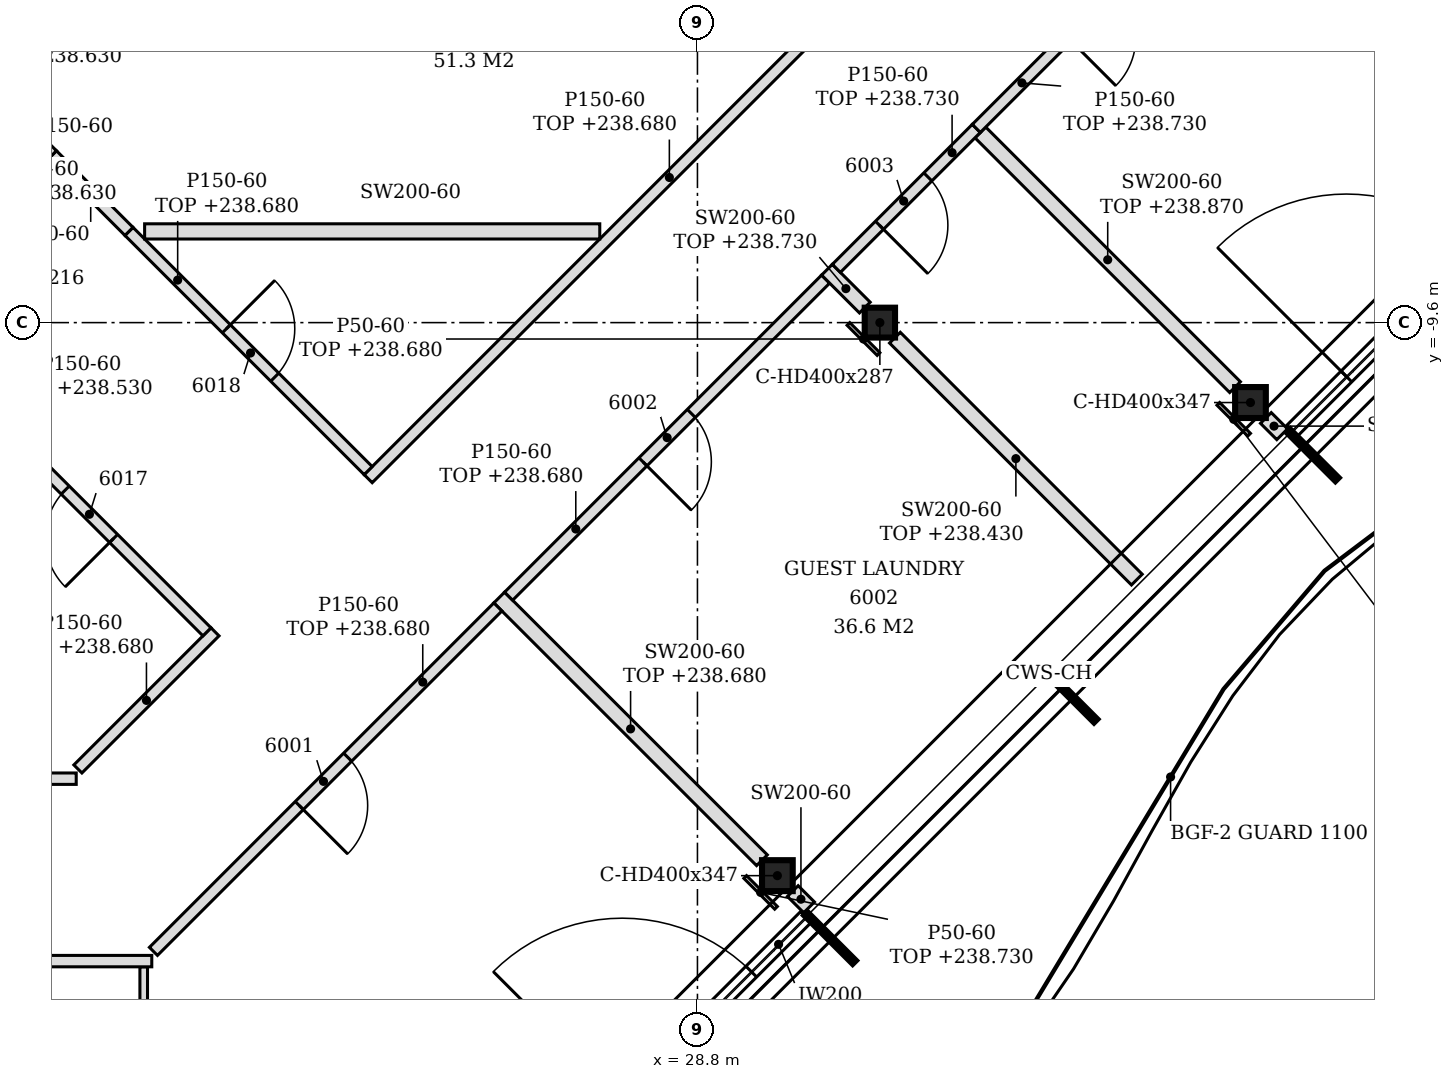
"""IFC4 building model, lengths in metres.
Left out: names, types, materials, properties, quantities, classifications, styles, units other than length and angle.
Written with IfcOpenShell. Run it as: python <this file> out.ifc"""

import sys

from ifc_helpers import new_model, si_unit, direction, frame, frame_2d, origin, origin_2d, place, context, subcontext, project, spatial, polyline, rectangle, i_section, outline, extrude, element, fill, save


model = new_model("IFC4")
c1 = context("Model", 3, precision=1e-05, world=origin(), true_north=direction((0.0, 1.0)))
c2 = subcontext(c1, "Body", "Model", "MODEL_VIEW")
j1 = project(units=[si_unit("LENGTHUNIT", "METRE"), si_unit("PLANEANGLEUNIT", "RADIAN")], contexts=[c1])
p1 = place(None, origin())
s1 = spatial("IfcSite", under=j1, at=p1, CompositionType="ELEMENT")
p2 = place(p1, origin())
s2 = spatial("IfcBuilding", under=s1, at=p2, CompositionType="ELEMENT")
p3 = place(p2, frame((0.0, 0.0, 235.8)))
s3 = spatial("IfcBuildingStorey", under=s2, at=p3, CompositionType="ELEMENT", Elevation=235.8)
for number, where, z_axis, x_axis in (
    (1, (29.852, -16.876, -0.15), (0.0, 0.0, 1.0), (1.0, 0.0, 0.0)),
    (2, (36.076, -10.652, -0.15), (0.0, 0.0, 1.0), (1.0, 0.0, 0.0)),
):
    element("IfcColumn", number, at=place(p3, frame(where, z_axis=z_axis, x_axis=x_axis)), inside=s3, PredefinedType="COLUMN", context=c2, shape_type="SweptSolid", body=[
        extrude(i_section(OverallWidth=0.404, OverallDepth=0.407, WebThickness=0.027, FlangeThickness=0.044, FilletRadius=0.015, at=origin_2d()), origin(), (0.0, 0.0, 1.0), 3.6),
    ])
p4 = place(p3, frame((31.2, -9.6, -0.15), z_axis=(0.0, 0.0, 1.0), x_axis=(1.0, 0.0, 0.0)))
e3 = element("IfcColumn", 3, at=p4, inside=s3, PredefinedType="COLUMN", context=c2, shape_type="SweptSolid", body=[
    extrude(i_section(OverallWidth=0.399, OverallDepth=0.393, WebThickness=0.023, FlangeThickness=0.037, FilletRadius=0.015, at=origin_2d()), origin(), (0.0, 0.0, 1.0), 3.6),
])
p5 = place(p3, frame((27.093, -20.553, 0.0), z_axis=(0.0, 0.0, 1.0), x_axis=(0.707079231393, 0.707134329907, 0.0)))
e4 = element("IfcWall", 4, at=p5, inside=s3, PredefinedType="NOTDEFINED", context=c2, shape_type="SweptSolid", body=[
    extrude(rectangle(XDim=4.431, YDim=0.2, at=frame_2d((2.215, 0.0))), origin(), (0.0, 0.0, 1.0), 3.45),
])
p6 = place(p5, frame((1.015, 0.0, 0.0)))
e5 = element("IfcOpeningElement", 5, at=p6, cuts=e4, PredefinedType="OPENING", context=c2, shape_type="SweptSolid", body=[
    extrude(rectangle(XDim=2.4, YDim=2.4, at=frame_2d((1.2, 1.2))), frame((0.0, 0.11, 0.0), z_axis=(0.0, -1.0, 0.0), x_axis=(1.0, 0.0, 0.0)), (0.0, 0.0, 1.0), 0.22),
])
p7 = place(p3, frame((36.62, -11.026, 0.0), z_axis=(0.0, 0.0, 1.0), x_axis=(0.707106781187, 0.707106781187, 0.0)))
e6 = element("IfcWall", 6, at=p7, inside=s3, PredefinedType="NOTDEFINED", context=c2, shape_type="SweptSolid", body=[
    extrude(rectangle(XDim=4.431, YDim=0.2, at=frame_2d((2.215, 0.0))), origin(), (0.0, 0.0, 1.0), 3.45),
])
p8 = place(p7, frame((1.015, 0.0, 0.0)))
e7 = element("IfcOpeningElement", 7, at=p8, cuts=e6, PredefinedType="OPENING", context=c2, shape_type="SweptSolid", body=[
    extrude(rectangle(XDim=2.4, YDim=2.4, at=frame_2d((1.2, 1.2))), frame((0.0, 0.11, 0.0), z_axis=(0.0, -1.0, 0.0), x_axis=(1.0, 0.0, 0.0)), (0.0, 0.0, 1.0), 0.22),
])
p9 = place(p3, frame((21.515, -20.35, 0.0), z_axis=(0.0, 0.0, 1.0), x_axis=(0.0, 1.0, 0.0)))
e8 = element("IfcWall", 8, at=p9, inside=s3, PredefinedType="PARTITIONING", context=c2, shape_type="SweptSolid", body=[
    extrude(outline(polyline([(0.0, 0.0), (2.275, 0.0), (2.275, 3.45), (1.245, 3.45), (1.243, 2.98), (1.055, 2.98), (1.053, 3.45), (0.0, 3.45), (0.0, 0.0)])), frame((0.0, 0.05, 0.0), z_axis=(0.0, -1.0, 0.0), x_axis=(1.0, 0.0, 0.0)), (0.0, 0.0, 1.0), 0.1),
])
p10 = place(p3, frame((-0.726, -18.0, 0.0), z_axis=(0.0, 0.0, 1.0), x_axis=(1.0, 0.0, 0.0)))
e9 = element("IfcWall", 9, at=p10, inside=s3, PredefinedType="PARTITIONING", context=c2, shape_type="SweptSolid", body=[
    extrude(outline(polyline([(0.0, 0.0), (22.347, 0.0), (22.347, 3.45), (20.076, 3.45), (20.074, 2.73), (19.776, 2.73), (19.774, 3.45), (8.076, 3.45), (8.074, 2.73), (7.776, 2.73), (7.774, 3.45), (1.086, 3.45), (1.084, 2.93), (0.512, 2.93), (0.51, 3.45), (0.0, 3.45), (0.0, 0.0)])), frame((0.0, 0.075, 0.0), z_axis=(0.0, -1.0, 0.0), x_axis=(1.0, 0.0, 0.0)), (0.0, 0.0, 1.0), 0.15),
])
p11 = place(p10, frame((5.676, 0.0, 0.0)))
e10 = element("IfcOpeningElement", 10, at=p11, cuts=e9, PredefinedType="OPENING", context=c2, shape_type="SweptSolid", body=[
    extrude(rectangle(XDim=0.9, YDim=2.1, at=frame_2d((0.45, 1.05))), frame((0.0, 0.085, 0.0), z_axis=(0.0, -1.0, 0.0), x_axis=(1.0, 0.0, 0.0)), (0.0, 0.0, 1.0), 0.17),
])
p12 = place(p3, frame((21.643, -17.872, 0.0), z_axis=(0.0, 0.0, 1.0), x_axis=(0.707106781187, 0.707106781187, 0.0)))
e11 = element("IfcWall", 11, at=p12, inside=s3, PredefinedType="PARTITIONING", context=c2, shape_type="SweptSolid", body=[
    extrude(rectangle(XDim=6.408, YDim=0.15, at=frame_2d((3.204, 0.0))), origin(), (0.0, 0.0, 1.0), 2.88),
])
p13 = place(p12, frame((2.713, 0.0, 0.0)))
e12 = element("IfcOpeningElement", 12, at=p13, cuts=e11, PredefinedType="OPENING", context=c2, shape_type="SweptSolid", body=[
    extrude(rectangle(XDim=0.9, YDim=2.1, at=frame_2d((0.45, 1.05))), frame((0.0, 0.085, 0.0), z_axis=(0.0, -1.0, 0.0), x_axis=(1.0, 0.0, 0.0)), (0.0, 0.0, 1.0), 0.17),
])
p14 = place(p3, frame((30.269, -17.293, 0.0), z_axis=(0.0, 0.0, 1.0), x_axis=(-0.707509117806, 0.706704215511, 0.0)))
e13 = element("IfcWall", 13, at=p14, inside=s3, PredefinedType="PARTITIONING", context=c2, shape_type="SweptSolid", body=[
    extrude(rectangle(XDim=0.303, YDim=0.2, at=frame_2d((0.152, 0.0))), origin(), (0.0, 0.0, 1.0), 3.45),
])
p15 = place(p3, frame((29.649, -16.673, 0.0), z_axis=(0.0, 0.0, 1.0), x_axis=(-0.707181695824, 0.707031858612, 0.0)))
e14 = element("IfcWall", 14, at=p15, inside=s3, PredefinedType="PARTITIONING", context=c2, shape_type="SweptSolid", body=[
    extrude(rectangle(XDim=4.888, YDim=0.2, at=frame_2d((2.444, 0.0))), origin(), (0.0, 0.0, 1.0), 2.88),
])
p16 = place(p3, frame((-0.312, -15.6, 0.0), z_axis=(0.0, 0.0, 1.0), x_axis=(1.0, 0.0, 0.0)))
e15 = element("IfcWall", 15, at=p16, inside=s3, PredefinedType="PARTITIONING", context=c2, shape_type="SweptSolid", body=[
    extrude(outline(polyline([(0.0, 0.0), (20.939, 0.0), (20.939, 3.45), (19.662, 3.45), (19.66, 2.73), (19.362, 2.73), (19.36, 3.45), (7.662, 3.45), (7.66, 2.73), (7.362, 2.73), (7.36, 3.45), (0.0, 3.45), (0.0, 0.0)])), frame((0.0, 0.075, 0.0), z_axis=(0.0, -1.0, 0.0), x_axis=(1.0, 0.0, 0.0)), (0.0, 0.0, 1.0), 0.15),
])
p17 = place(p16, frame((17.012, 0.0, 0.0)))
e16 = element("IfcOpeningElement", 16, at=p17, cuts=e15, PredefinedType="OPENING", context=c2, shape_type="SweptSolid", body=[
    extrude(rectangle(XDim=0.8, YDim=2.1, at=frame_2d((0.4, 1.05))), frame((0.0, 0.085, 0.0), z_axis=(0.0, -1.0, 0.0), x_axis=(1.0, 0.0, 0.0)), (0.0, 0.0, 1.0), 0.17),
])
p18 = place(p3, frame((20.649, -15.472, 0.0), z_axis=(0.0, 0.0, 1.0), x_axis=(0.707106781187, 0.707106781187, 0.0)))
e17 = element("IfcWall", 17, at=p18, inside=s3, PredefinedType="PARTITIONING", context=c2, shape_type="SweptSolid", body=[
    extrude(rectangle(XDim=2.551, YDim=0.15, at=frame_2d((1.276, 0.0))), origin(), (0.0, 0.0, 1.0), 2.88),
])
p19 = place(p3, frame((22.347, -13.668, 0.0), z_axis=(0.0, 0.0, 1.0), x_axis=(-0.707106781187, 0.707106781187, 0.0)))
e18 = element("IfcWall", 18, at=p19, inside=s3, PredefinedType="PARTITIONING", context=c2, shape_type="SweptSolid", body=[
    extrude(rectangle(XDim=4.45, YDim=0.15, at=frame_2d((2.225, 0.0))), origin(), (0.0, 0.0, 1.0), 2.73),
])
p20 = place(p19, frame((1.737, 0.0, 0.0)))
e19 = element("IfcOpeningElement", 19, at=p20, cuts=e18, PredefinedType="OPENING", context=c2, shape_type="SweptSolid", body=[
    extrude(rectangle(XDim=0.9, YDim=2.1, at=frame_2d((0.45, 1.05))), frame((0.0, 0.085, 0.0), z_axis=(0.0, -1.0, 0.0), x_axis=(1.0, 0.0, 0.0)), (0.0, 0.0, 1.0), 0.17),
])
p21 = place(p3, frame((26.316, -13.199, 0.0), z_axis=(0.0, 0.0, 1.0), x_axis=(0.707024001185, 0.707189551498, 0.0)))
e20 = element("IfcWall", 20, at=p21, inside=s3, PredefinedType="PARTITIONING", context=c2, shape_type="SweptSolid", body=[
    extrude(rectangle(XDim=5.899, YDim=0.15, at=frame_2d((2.949, 0.0))), origin(), (0.0, 0.0, 1.0), 2.88),
])
p22 = place(p21, frame((2.5, 0.0, 0.0)))
e21 = element("IfcOpeningElement", 21, at=p22, cuts=e20, PredefinedType="OPENING", context=c2, shape_type="SweptSolid", body=[
    extrude(rectangle(XDim=0.9, YDim=2.1, at=frame_2d((0.45, 1.05))), frame((0.0, 0.085, 0.0), z_axis=(0.0, -1.0, 0.0), x_axis=(1.0, 0.0, 0.0)), (0.0, 0.0, 1.0), 0.17),
])
p23 = place(p3, frame((34.581, -12.981, 0.0), z_axis=(0.0, 0.0, 1.0), x_axis=(-0.707133900936, 0.707079660397, 0.0)))
e22 = element("IfcWall", 22, at=p23, inside=s3, PredefinedType="PARTITIONING", context=c2, shape_type="SweptSolid", body=[
    extrude(rectangle(XDim=4.501, YDim=0.2, at=frame_2d((2.25, 0.0))), origin(), (0.0, 0.0, 1.0), 2.63),
])
p24 = place(p3, frame((24.468, -11.653, 0.0), z_axis=(0.0, 0.0, 1.0), x_axis=(0.707095889299, 0.707117672906, 0.0)))
e23 = element("IfcWall", 23, at=p24, inside=s3, PredefinedType="PARTITIONING", context=c2, shape_type="SweptSolid", body=[
    extrude(rectangle(XDim=11.208, YDim=0.15, at=frame_2d((5.604, 0.0))), origin(), (0.0, 0.0, 1.0), 2.88),
])
p25 = place(p3, frame((24.468, -11.547, 0.0), z_axis=(0.0, 0.0, 1.0), x_axis=(-0.707079353217, 0.707134208093, 0.0)))
e24 = element("IfcWall", 24, at=p25, inside=s3, PredefinedType="PARTITIONING", context=c2, shape_type="SweptSolid", body=[
    extrude(rectangle(XDim=4.451, YDim=0.15, at=frame_2d((2.225, 0.0))), origin(), (0.0, 0.0, 1.0), 2.88),
])
p26 = place(p25, frame((1.739, 0.0, 0.0)))
e25 = element("IfcOpeningElement", 25, at=p26, cuts=e24, PredefinedType="OPENING", context=c2, shape_type="SweptSolid", body=[
    extrude(rectangle(XDim=0.9, YDim=2.1, at=frame_2d((0.45, 1.05))), frame((0.0, 0.085, 0.0), z_axis=(0.0, -1.0, 0.0), x_axis=(1.0, 0.0, 0.0)), (0.0, 0.0, 1.0), 0.17),
])
p27 = place(p3, frame((36.493, -11.069, 0.0), z_axis=(0.0, 0.0, 1.0), x_axis=(-0.707106781187, 0.707106781187, 0.0)))
e26 = element("IfcWall", 26, at=p27, inside=s3, PredefinedType="PARTITIONING", context=c2, shape_type="SweptSolid", body=[
    extrude(rectangle(XDim=0.303, YDim=0.2, at=frame_2d((0.152, 0.0))), origin(), (0.0, 0.0, 1.0), 3.45),
])
p28 = place(p3, frame((35.873, -10.449, 0.0), z_axis=(0.0, 0.0, 1.0), x_axis=(-0.707081021846, 0.707132539589, 0.0)))
e27 = element("IfcWall", 27, at=p28, inside=s3, PredefinedType="PARTITIONING", context=c2, shape_type="SweptSolid", body=[
    extrude(rectangle(XDim=4.739, YDim=0.2, at=frame_2d((2.37, 0.0))), origin(), (0.0, 0.0, 1.0), 3.07),
])
p29 = place(p3, frame((31.002, -9.402, 0.0), z_axis=(0.0, 0.0, 1.0), x_axis=(-0.707106781187, 0.707106781187, 0.0)))
e28 = element("IfcWall", 28, at=p29, inside=s3, PredefinedType="PARTITIONING", context=c2, shape_type="SweptSolid", body=[
    extrude(rectangle(XDim=0.704, YDim=0.2, at=frame_2d((0.352, 0.0))), origin(), (0.0, 0.0, 1.0), 2.93),
])
p30 = place(p3, frame((30.628, -8.886, 0.0), z_axis=(0.0, 0.0, 1.0), x_axis=(0.707106781187, 0.707106781187, 0.0)))
e29 = element("IfcWall", 29, at=p30, inside=s3, PredefinedType="PARTITIONING", context=c2, shape_type="SweptSolid", body=[
    extrude(rectangle(XDim=2.604, YDim=0.15, at=frame_2d((1.302, 0.0))), origin(), (0.0, 0.0, 1.0), 2.93),
])
p31 = place(p30, frame((0.802, 0.0, 0.0)))
e30 = element("IfcOpeningElement", 30, at=p31, cuts=e29, PredefinedType="OPENING", context=c2, shape_type="SweptSolid", body=[
    extrude(rectangle(XDim=0.9, YDim=2.1, at=frame_2d((0.45, 1.05))), frame((0.0, 0.085, 0.0), z_axis=(0.0, -1.0, 0.0), x_axis=(1.0, 0.0, 0.0)), (0.0, 0.0, 1.0), 0.17),
])
p32 = place(p3, frame((21.321, -8.4, 0.0), z_axis=(0.0, 0.0, 1.0), x_axis=(-0.706763941595, 0.707449454633, 0.0)))
e31 = element("IfcWall", 31, at=p32, inside=s3, PredefinedType="PARTITIONING", context=c2, shape_type="SweptSolid", body=[
    extrude(rectangle(XDim=1.425, YDim=0.15, at=frame_2d((0.712, 0.0))), origin(), (0.0, 0.0, 1.0), 3.45),
])
p33 = place(p3, frame((21.527, -8.4, 0.0), z_axis=(0.0, 0.0, 1.0), x_axis=(1.0, 0.0, 0.0)))
e32 = element("IfcWall", 32, at=p33, inside=s3, PredefinedType="PARTITIONING", context=c2, shape_type="SweptSolid", body=[
    extrude(rectangle(XDim=5.988, YDim=0.2, at=frame_2d((2.994, 0.0))), origin(), (0.0, 0.0, 1.0), 3.45),
])
p34 = place(p3, frame((19.392, -8.208, 0.0), z_axis=(0.0, 0.0, 1.0), x_axis=(0.707106781187, 0.707106781187, 0.0)))
e33 = element("IfcWall", 33, at=p34, inside=s3, PredefinedType="PARTITIONING", context=c2, shape_type="SweptSolid", body=[
    extrude(rectangle(XDim=1.304, YDim=0.15, at=frame_2d((0.652, 0.0))), origin(), (0.0, 0.0, 1.0), 3.45),
])
p35 = place(p3, frame((32.469, -7.045, 0.0), z_axis=(0.0, 0.0, 1.0), x_axis=(0.70722059203, 0.706992952022, 0.0)))
e34 = element("IfcWall", 34, at=p35, inside=s3, PredefinedType="PARTITIONING", context=c2, shape_type="SweptSolid", body=[
    extrude(rectangle(XDim=4.29, YDim=0.15, at=frame_2d((2.145, 0.0))), origin(), (0.0, 0.0, 1.0), 2.93),
])
p36 = place(p35, frame((1.695, 0.0, 0.0)))
e35 = element("IfcOpeningElement", 35, at=p36, cuts=e34, PredefinedType="OPENING", context=c2, shape_type="SweptSolid", body=[
    extrude(rectangle(XDim=0.9, YDim=2.1, at=frame_2d((0.45, 1.05))), frame((0.0, 0.085, 0.0), z_axis=(0.0, -1.0, 0.0), x_axis=(1.0, 0.0, 0.0)), (0.0, 0.0, 1.0), 0.17),
])
p37 = place(p3, frame((29.834, -17.299, 0.0), z_axis=(0.0, 0.0, 1.0), x_axis=(-0.707319540847, 0.70689395749, 0.0)))
e36 = element("IfcWall", 36, at=p37, inside=s3, PredefinedType="PARTITIONING", context=c2, shape_type="SweptSolid", body=[
    extrude(rectangle(XDim=0.574, YDim=0.05, at=frame_2d((0.287, 0.0))), origin(), (0.0, 0.0, 1.0), 2.93),
])
p38 = place(p3, frame((31.182, -10.014, 0.0), z_axis=(0.0, 0.0, 1.0), x_axis=(-0.707106781187, 0.707106781187, 0.0)))
e37 = element("IfcWall", 37, at=p38, inside=s3, PredefinedType="PARTITIONING", context=c2, shape_type="SweptSolid", body=[
    extrude(rectangle(XDim=0.56, YDim=0.05, at=frame_2d((0.28, 0.0))), origin(), (0.0, 0.0, 1.0), 2.88),
])
p39 = place(p3, frame((36.058, -11.075, 0.0), z_axis=(0.0, 0.0, 1.0), x_axis=(-0.707106781187, 0.707106781187, 0.0)))
e38 = element("IfcWall", 38, at=p39, inside=s3, PredefinedType="PARTITIONING", context=c2, shape_type="SweptSolid", body=[
    extrude(rectangle(XDim=0.573, YDim=0.05, at=frame_2d((0.287, 0.0))), origin(), (0.0, 0.0, 1.0), 2.63),
])
p40 = place(p6, origin())
e39 = element("IfcDoor", 39, at=p40, inside=s3, OperationType="SINGLE_SWING_LEFT", PredefinedType="DOOR", context=c2, shape_type="SweptSolid", body=[
    extrude(rectangle(XDim=2.4, YDim=2.4, at=frame_2d((1.2, 1.2))), frame((0.0, 0.025, 0.0), z_axis=(0.0, -1.0, 0.0), x_axis=(1.0, 0.0, 0.0)), (0.0, 0.0, 1.0), 0.05),
])
fill(e5, e39)
p41 = place(p8, origin())
e40 = element("IfcDoor", 40, at=p41, inside=s3, OperationType="SINGLE_SWING_LEFT", PredefinedType="DOOR", context=c2, shape_type="SweptSolid", body=[
    extrude(rectangle(XDim=2.4, YDim=2.4, at=frame_2d((1.2, 1.2))), frame((0.0, 0.025, 0.0), z_axis=(0.0, -1.0, 0.0), x_axis=(1.0, 0.0, 0.0)), (0.0, 0.0, 1.0), 0.05),
])
fill(e7, e40)
p42 = place(p13, frame((0.9, 0.0, 0.0), z_axis=(0.0, 0.0, 1.0), x_axis=(-1.0, 0.0, 0.0)))
e41 = element("IfcDoor", 41, at=p42, inside=s3, OperationType="SINGLE_SWING_RIGHT", PredefinedType="DOOR", context=c2, shape_type="SweptSolid", body=[
    extrude(rectangle(XDim=0.9, YDim=2.1, at=frame_2d((0.45, 1.05))), frame((0.0, 0.025, 0.0), z_axis=(0.0, -1.0, 0.0), x_axis=(1.0, 0.0, 0.0)), (0.0, 0.0, 1.0), 0.05),
])
fill(e12, e41)
p43 = place(p22, frame((0.9, 0.0, 0.0), z_axis=(0.0, 0.0, 1.0), x_axis=(-1.0, 0.0, 0.0)))
e42 = element("IfcDoor", 42, at=p43, inside=s3, OperationType="SINGLE_SWING_RIGHT", PredefinedType="DOOR", context=c2, shape_type="SweptSolid", body=[
    extrude(rectangle(XDim=0.9, YDim=2.1, at=frame_2d((0.45, 1.05))), frame((0.0, 0.025, 0.0), z_axis=(0.0, -1.0, 0.0), x_axis=(1.0, 0.0, 0.0)), (0.0, 0.0, 1.0), 0.05),
])
fill(e21, e42)
p44 = place(p31, frame((0.9, 0.0, 0.0), z_axis=(0.0, 0.0, 1.0), x_axis=(-1.0, 0.0, 0.0)))
e43 = element("IfcDoor", 43, at=p44, inside=s3, OperationType="SINGLE_SWING_RIGHT", PredefinedType="DOOR", context=c2, shape_type="SweptSolid", body=[
    extrude(rectangle(XDim=0.9, YDim=2.1, at=frame_2d((0.45, 1.05))), frame((0.0, 0.025, 0.0), z_axis=(0.0, -1.0, 0.0), x_axis=(1.0, 0.0, 0.0)), (0.0, 0.0, 1.0), 0.05),
])
fill(e30, e43)
p45 = place(p20, origin())
e44 = element("IfcDoor", 44, at=p45, inside=s3, OperationType="SINGLE_SWING_LEFT", PredefinedType="DOOR", context=c2, shape_type="SweptSolid", body=[
    extrude(rectangle(XDim=0.9, YDim=2.1, at=frame_2d((0.45, 1.05))), frame((0.0, 0.025, 0.0), z_axis=(0.0, -1.0, 0.0), x_axis=(1.0, 0.0, 0.0)), (0.0, 0.0, 1.0), 0.05),
])
fill(e19, e44)
p46 = place(p26, frame((0.9, 0.0, 0.0), z_axis=(0.0, 0.0, 1.0), x_axis=(-1.0, 0.0, 0.0)))
e45 = element("IfcDoor", 45, at=p46, inside=s3, OperationType="SINGLE_SWING_LEFT", PredefinedType="DOOR", context=c2, shape_type="SweptSolid", body=[
    extrude(rectangle(XDim=0.9, YDim=2.1, at=frame_2d((0.45, 1.05))), frame((0.0, 0.025, 0.0), z_axis=(0.0, -1.0, 0.0), x_axis=(1.0, 0.0, 0.0)), (0.0, 0.0, 1.0), 0.05),
])
fill(e25, e45)
save(model, sys.argv[1])
